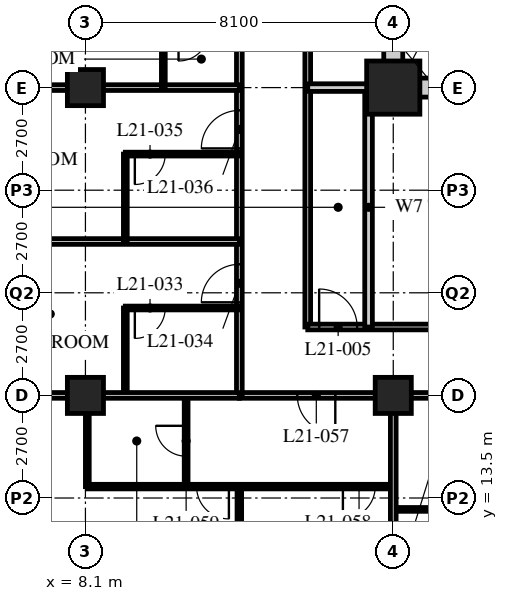
"""IFC4 building model, lengths in metres.
Left out: names, types, materials, properties, quantities, classifications, styles, units other than length and angle.
Written with IfcOpenShell. Run it as: python <this file> out.ifc"""

import sys

from ifc_helpers import new_model, si_unit, direction, frame, frame_2d, origin, origin_2d, place, context, subcontext, project, spatial, rectangle, hollow_rectangle, extrude, element, fill, save


model = new_model("IFC4")
c1 = context("Model", 3, precision=1e-05, world=origin(), true_north=direction((0.0, 1.0)))
c2 = subcontext(c1, "Body", "Model", "MODEL_VIEW")
j1 = project(units=[si_unit("LENGTHUNIT", "METRE"), si_unit("PLANEANGLEUNIT", "RADIAN")], contexts=[c1])
p1 = place(None, origin())
s1 = spatial("IfcSite", under=j1, at=p1, CompositionType="ELEMENT")
p2 = place(p1, origin())
s2 = spatial("IfcBuilding", under=s1, at=p2, CompositionType="ELEMENT")
p3 = place(p2, frame((0.0, 0.0, 84.0)))
s3 = spatial("IfcBuildingStorey", under=s2, at=p3, CompositionType="ELEMENT", Elevation=84.0)
for number, where, z_axis, x_axis in (
    (1, (8.1, 16.2, 0.0), (0.0, 0.0, 1.0), (1.0, 0.0, 0.0)),
    (2, (8.1, 24.3, 0.0), (0.0, 0.0, 1.0), (1.0, 0.0, 0.0)),
    (3, (16.2, 16.2, 0.0), (0.0, 0.0, 1.0), (1.0, 0.0, 0.0)),
):
    element("IfcColumn", number, at=place(p3, frame(where, z_axis=z_axis, x_axis=x_axis)), inside=s3, PredefinedType="COLUMN", context=c2, shape_type="SweptSolid", body=[
        extrude(hollow_rectangle(XDim=0.95, YDim=0.95, WallThickness=0.095, at=origin_2d()), origin(), (0.0, 0.0, 1.0), 3.4),
    ])
p4 = place(p3, frame((16.2, 24.3, 0.0), z_axis=(0.0, 0.0, 1.0), x_axis=(1.0, 0.0, 0.0)))
e4 = element("IfcColumn", 4, at=p4, inside=s3, PredefinedType="COLUMN", context=c2, shape_type="SweptSolid", body=[
    extrude(hollow_rectangle(XDim=1.4, YDim=1.4, WallThickness=0.12, at=origin_2d()), origin(), (0.0, 0.0, 1.0), 3.4),
])
p5 = place(p3, frame((12.15, 16.2, 0.0), z_axis=(0.0, 0.0, 1.0), x_axis=(1.0, 0.0, 0.0)))
e5 = element("IfcWall", 5, at=p5, inside=s3, PredefinedType="PARTITIONING", context=c2, shape_type="SweptSolid", body=[
    extrude(rectangle(XDim=32.4, YDim=0.15, at=frame_2d((16.2, 0.0))), origin(), (0.0, 0.0, 1.0), 2.428),
])
p6 = place(p5, frame((6.5, 0.0, 0.0)))
e6 = element("IfcOpeningElement", 6, at=p6, cuts=e5, PredefinedType="OPENING", context=c2, shape_type="SweptSolid", body=[
    extrude(rectangle(XDim=1.0, YDim=2.1, at=frame_2d((0.5, 1.05))), frame((0.0, 0.085, 0.0), z_axis=(0.0, -1.0, 0.0), x_axis=(1.0, 0.0, 0.0)), (0.0, 0.0, 1.0), 0.17),
])
p7 = place(p5, frame((8.4, 0.0, 0.0)))
e7 = element("IfcOpeningElement", 7, at=p7, cuts=e5, PredefinedType="OPENING", context=c2, shape_type="SweptSolid", body=[
    extrude(rectangle(XDim=1.0, YDim=2.1, at=frame_2d((0.5, 1.05))), frame((0.0, 0.085, 0.0), z_axis=(0.0, -1.0, 0.0), x_axis=(1.0, 0.0, 0.0)), (0.0, 0.0, 1.0), 0.17),
])
p8 = place(p5, frame((14.9, 0.0, 0.0)))
e8 = element("IfcOpeningElement", 8, at=p8, cuts=e5, PredefinedType="OPENING", context=c2, shape_type="SweptSolid", body=[
    extrude(rectangle(XDim=1.0, YDim=2.1, at=frame_2d((0.5, 1.05))), frame((0.0, 0.085, 0.0), z_axis=(0.0, -1.0, 0.0), x_axis=(1.0, 0.0, 0.0)), (0.0, 0.0, 1.0), 0.17),
])
p9 = place(p5, frame((16.5, 0.0, 0.0)))
e9 = element("IfcOpeningElement", 9, at=p9, cuts=e5, PredefinedType="OPENING", context=c2, shape_type="SweptSolid", body=[
    extrude(rectangle(XDim=1.0, YDim=2.1, at=frame_2d((0.5, 1.05))), frame((0.0, 0.085, 0.0), z_axis=(0.0, -1.0, 0.0), x_axis=(1.0, 0.0, 0.0)), (0.0, 0.0, 1.0), 0.17),
])
p10 = place(p5, frame((23.0, 0.0, 0.0)))
e10 = element("IfcOpeningElement", 10, at=p10, cuts=e5, PredefinedType="OPENING", context=c2, shape_type="SweptSolid", body=[
    extrude(rectangle(XDim=1.0, YDim=2.1, at=frame_2d((0.5, 1.05))), frame((0.0, 0.085, 0.0), z_axis=(0.0, -1.0, 0.0), x_axis=(1.0, 0.0, 0.0)), (0.0, 0.0, 1.0), 0.17),
])
p11 = place(p5, frame((24.9, 0.0, 0.0)))
e11 = element("IfcOpeningElement", 11, at=p11, cuts=e5, PredefinedType="OPENING", context=c2, shape_type="SweptSolid", body=[
    extrude(rectangle(XDim=1.0, YDim=2.1, at=frame_2d((0.5, 1.05))), frame((0.0, 0.085, 0.0), z_axis=(0.0, -1.0, 0.0), x_axis=(1.0, 0.0, 0.0)), (0.0, 0.0, 1.0), 0.17),
])
p12 = place(p5, frame((1.525, 0.0, 0.0)))
e12 = element("IfcOpeningElement", 12, at=p12, cuts=e5, PredefinedType="OPENING", context=c2, shape_type="SweptSolid", body=[
    extrude(rectangle(XDim=1.0, YDim=2.1, at=frame_2d((0.5, 1.05))), frame((0.0, 0.085, 0.0), z_axis=(0.0, -1.0, 0.0), x_axis=(1.0, 0.0, 0.0)), (0.0, 0.0, 1.0), 0.17),
])
p13 = place(p5, frame((29.875, 0.0, 0.0)))
e13 = element("IfcOpeningElement", 13, at=p13, cuts=e5, PredefinedType="OPENING", context=c2, shape_type="SweptSolid", body=[
    extrude(rectangle(XDim=1.0, YDim=2.1, at=frame_2d((0.5, 1.05))), frame((0.0, 0.085, 0.0), z_axis=(0.0, -1.0, 0.0), x_axis=(1.0, 0.0, 0.0)), (0.0, 0.0, 1.0), 0.17),
])
p14 = place(p3, frame((12.15, 16.2, 0.0), z_axis=(0.0, 0.0, 1.0), x_axis=(0.0, 1.0, 0.0)))
e14 = element("IfcWall", 14, at=p14, inside=s3, PredefinedType="PARTITIONING", context=c2, shape_type="SweptSolid", body=[
    extrude(rectangle(XDim=26.1, YDim=0.15, at=frame_2d((13.05, 0.0))), origin(), (0.0, 0.0, 1.0), 3.19),
])
p15 = place(p14, frame((2.45, 0.0, 0.0)))
e15 = element("IfcOpeningElement", 15, at=p15, cuts=e14, PredefinedType="OPENING", context=c2, shape_type="SweptSolid", body=[
    extrude(rectangle(XDim=1.0, YDim=2.1, at=frame_2d((0.5, 1.05))), frame((0.0, 0.085, 0.0), z_axis=(0.0, -1.0, 0.0), x_axis=(1.0, 0.0, 0.0)), (0.0, 0.0, 1.0), 0.17),
])
p16 = place(p14, frame((6.5, 0.0, 0.0)))
e16 = element("IfcOpeningElement", 16, at=p16, cuts=e14, PredefinedType="OPENING", context=c2, shape_type="SweptSolid", body=[
    extrude(rectangle(XDim=1.0, YDim=2.1, at=frame_2d((0.5, 1.05))), frame((0.0, 0.085, 0.0), z_axis=(0.0, -1.0, 0.0), x_axis=(1.0, 0.0, 0.0)), (0.0, 0.0, 1.0), 0.17),
])
p17 = place(p14, frame((10.0, 0.0, 0.0)))
e17 = element("IfcOpeningElement", 17, at=p17, cuts=e14, PredefinedType="OPENING", context=c2, shape_type="SweptSolid", body=[
    extrude(rectangle(XDim=1.0, YDim=2.1, at=frame_2d((0.5, 1.05))), frame((0.0, 0.085, 0.0), z_axis=(0.0, -1.0, 0.0), x_axis=(1.0, 0.0, 0.0)), (0.0, 0.0, 1.0), 0.17),
])
p18 = place(p14, frame((18.1, 0.0, 0.0)))
e18 = element("IfcOpeningElement", 18, at=p18, cuts=e14, PredefinedType="OPENING", context=c2, shape_type="SweptSolid", body=[
    extrude(rectangle(XDim=1.0, YDim=2.1, at=frame_2d((0.5, 1.05))), frame((0.0, 0.085, 0.0), z_axis=(0.0, -1.0, 0.0), x_axis=(1.0, 0.0, 0.0)), (0.0, 0.0, 1.0), 0.17),
])
p19 = place(p3, frame((13.95, 40.5, 0.0), z_axis=(0.0, 0.0, 1.0), x_axis=(0.0, -1.0, 0.0)))
e19 = element("IfcWall", 19, at=p19, inside=s3, PredefinedType="PARTITIONING", context=c2, shape_type="SweptSolid", body=[
    extrude(rectangle(XDim=22.5, YDim=0.15, at=frame_2d((11.25, 0.0))), origin(), (0.0, 0.0, 1.0), 3.19),
])
p20 = place(p19, frame((11.65, 0.0, 0.0)))
e20 = element("IfcOpeningElement", 20, at=p20, cuts=e19, PredefinedType="OPENING", context=c2, shape_type="SweptSolid", body=[
    extrude(rectangle(XDim=1.0, YDim=2.1, at=frame_2d((0.5, 1.05))), frame((0.0, 0.085, 0.0), z_axis=(0.0, -1.0, 0.0), x_axis=(1.0, 0.0, 0.0)), (0.0, 0.0, 1.0), 0.17),
])
p21 = place(p19, frame((3.55, 0.0, 0.0)))
e21 = element("IfcOpeningElement", 21, at=p21, cuts=e19, PredefinedType="OPENING", context=c2, shape_type="SweptSolid", body=[
    extrude(rectangle(XDim=1.0, YDim=2.1, at=frame_2d((0.5, 1.05))), frame((0.0, 0.085, 0.0), z_axis=(0.0, -1.0, 0.0), x_axis=(1.0, 0.0, 0.0)), (0.0, 0.0, 1.0), 0.17),
])
p22 = place(p3, frame((13.95, 18.0, 0.0), z_axis=(0.0, 0.0, 1.0), x_axis=(1.0, 0.0, 0.0)))
e22 = element("IfcWall", 22, at=p22, inside=s3, PredefinedType="PARTITIONING", context=c2, shape_type="SweptSolid", body=[
    extrude(rectangle(XDim=13.19, YDim=0.15, at=frame_2d((6.595, 0.0))), origin(), (0.0, 0.0, 1.0), 3.19),
])
p23 = place(p22, frame((0.3, 0.0, 0.0)))
e23 = element("IfcOpeningElement", 23, at=p23, cuts=e22, PredefinedType="OPENING", context=c2, shape_type="SweptSolid", body=[
    extrude(rectangle(XDim=1.0, YDim=2.1, at=frame_2d((0.5, 1.05))), frame((0.0, 0.085, 0.0), z_axis=(0.0, -1.0, 0.0), x_axis=(1.0, 0.0, 0.0)), (0.0, 0.0, 1.0), 0.17),
])
p24 = place(p22, frame((6.9, 0.0, 0.0)))
e24 = element("IfcOpeningElement", 24, at=p24, cuts=e22, PredefinedType="OPENING", context=c2, shape_type="SweptSolid", body=[
    extrude(rectangle(XDim=1.0, YDim=2.1, at=frame_2d((0.5, 1.05))), frame((0.0, 0.085, 0.0), z_axis=(0.0, -1.0, 0.0), x_axis=(1.0, 0.0, 0.0)), (0.0, 0.0, 1.0), 0.17),
])
p25 = place(p3, frame((15.55, 18.0, 0.0), z_axis=(0.0, 0.0, 1.0), x_axis=(0.0, 1.0, 0.0)))
e25 = element("IfcWall", 25, at=p25, inside=s3, PredefinedType="SOLIDWALL", context=c2, shape_type="SweptSolid", body=[
    extrude(rectangle(XDim=6.3, YDim=0.2, at=frame_2d((3.15, 0.0))), origin(), (0.0, 0.0, 1.0), 3.19),
])
p26 = place(p3, frame((13.95, 24.3, 0.0), z_axis=(0.0, 0.0, 1.0), x_axis=(1.0, 0.0, 0.0)))
e26 = element("IfcWall", 26, at=p26, inside=s3, PredefinedType="SOLIDWALL", context=c2, shape_type="SweptSolid", body=[
    extrude(rectangle(XDim=2.25, YDim=0.2, at=frame_2d((1.125, 0.0))), origin(), (0.0, 0.0, 1.0), 2.428),
])
for number, where, z_axis, x_axis in (
    (27, (16.2, 13.2, 0.0), (0.0, 0.0, 1.0), (1.0, 0.0, 0.0)),
    (28, (9.15, 16.2, 0.0), (0.0, 0.0, 1.0), (0.0, 1.0, 0.0)),
):
    element("IfcWall", number, at=place(p3, frame(where, z_axis=z_axis, x_axis=x_axis)), inside=s3, PredefinedType="PARTITIONING", context=c2, shape_type="SweptSolid", body=[
        extrude(rectangle(XDim=2.3, YDim=0.1, at=frame_2d((1.15, 0.0))), origin(), (0.0, 0.0, 1.0), 3.19),
    ])
p27 = place(p3, frame((12.15, 18.5, 0.0), z_axis=(0.0, 0.0, 1.0), x_axis=(-1.0, 0.0, 0.0)))
e29 = element("IfcWall", 29, at=p27, inside=s3, PredefinedType="PARTITIONING", context=c2, shape_type="SweptSolid", body=[
    extrude(rectangle(XDim=3.0, YDim=0.1, at=frame_2d((1.5, 0.0))), origin(), (0.0, 0.0, 1.0), 3.19),
])
p28 = place(p27, frame((1.95, 0.0, 0.0)))
e30 = element("IfcOpeningElement", 30, at=p28, cuts=e29, PredefinedType="OPENING", context=c2, shape_type="SweptSolid", body=[
    extrude(rectangle(XDim=0.8, YDim=2.1, at=frame_2d((0.4, 1.05))), frame((0.0, 0.06, 0.0), z_axis=(0.0, -1.0, 0.0), x_axis=(1.0, 0.0, 0.0)), (0.0, 0.0, 1.0), 0.12),
])
p29 = place(p3, frame((12.15, 20.25, 0.0), z_axis=(0.0, 0.0, 1.0), x_axis=(-1.0, 0.0, 0.0)))
e31 = element("IfcWall", 31, at=p29, inside=s3, PredefinedType="PARTITIONING", context=c2, shape_type="SweptSolid", body=[
    extrude(rectangle(XDim=11.85, YDim=0.15, at=frame_2d((5.925, 0.0))), origin(), (0.0, 0.0, 1.0), 3.19),
])
p30 = place(p3, frame((9.15, 20.25, 0.0), z_axis=(0.0, 0.0, 1.0), x_axis=(0.0, 1.0, 0.0)))
e32 = element("IfcWall", 32, at=p30, inside=s3, PredefinedType="PARTITIONING", context=c2, shape_type="SweptSolid", body=[
    extrude(rectangle(XDim=2.3, YDim=0.1, at=frame_2d((1.15, 0.0))), origin(), (0.0, 0.0, 1.0), 3.19),
])
p31 = place(p3, frame((12.15, 22.55, 0.0), z_axis=(0.0, 0.0, 1.0), x_axis=(-1.0, 0.0, 0.0)))
e33 = element("IfcWall", 33, at=p31, inside=s3, PredefinedType="PARTITIONING", context=c2, shape_type="SweptSolid", body=[
    extrude(rectangle(XDim=3.0, YDim=0.1, at=frame_2d((1.5, 0.0))), origin(), (0.0, 0.0, 1.0), 3.19),
])
p32 = place(p31, frame((1.95, 0.0, 0.0)))
e34 = element("IfcOpeningElement", 34, at=p32, cuts=e33, PredefinedType="OPENING", context=c2, shape_type="SweptSolid", body=[
    extrude(rectangle(XDim=0.8, YDim=2.1, at=frame_2d((0.4, 1.05))), frame((0.0, 0.06, 0.0), z_axis=(0.0, -1.0, 0.0), x_axis=(1.0, 0.0, 0.0)), (0.0, 0.0, 1.0), 0.12),
])
p33 = place(p3, frame((12.15, 24.3, 0.0), z_axis=(0.0, 0.0, 1.0), x_axis=(-1.0, 0.0, 0.0)))
e35 = element("IfcWall", 35, at=p33, inside=s3, PredefinedType="PARTITIONING", context=c2, shape_type="SweptSolid", body=[
    extrude(rectangle(XDim=11.85, YDim=0.15, at=frame_2d((5.925, 0.0))), origin(), (0.0, 0.0, 1.0), 2.428),
])
p34 = place(p3, frame((10.15, 24.3, 0.0), z_axis=(0.0, 0.0, 1.0), x_axis=(0.0, 1.0, 0.0)))
e36 = element("IfcWall", 36, at=p34, inside=s3, PredefinedType="PARTITIONING", context=c2, shape_type="SweptSolid", body=[
    extrude(rectangle(XDim=1.5, YDim=0.1, at=frame_2d((0.75, 0.0))), origin(), (0.0, 0.0, 1.0), 3.19),
])
p35 = place(p3, frame((10.75, 16.2, 0.0), z_axis=(0.0, 0.0, 1.0), x_axis=(0.0, -1.0, 0.0)))
e37 = element("IfcWall", 37, at=p35, inside=s3, PredefinedType="PARTITIONING", context=c2, shape_type="SweptSolid", body=[
    extrude(rectangle(XDim=2.4, YDim=0.1, at=frame_2d((1.2, 0.0))), origin(), (0.0, 0.0, 1.0), 3.19),
])
p36 = place(p35, frame((0.8, 0.0, 0.0)))
e38 = element("IfcOpeningElement", 38, at=p36, cuts=e37, PredefinedType="OPENING", context=c2, shape_type="SweptSolid", body=[
    extrude(rectangle(XDim=0.8, YDim=2.1, at=frame_2d((0.4, 1.05))), frame((0.0, 0.06, 0.0), z_axis=(0.0, -1.0, 0.0), x_axis=(1.0, 0.0, 0.0)), (0.0, 0.0, 1.0), 0.12),
])
p37 = place(p3, frame((8.15, 16.2, 0.0), z_axis=(0.0, 0.0, 1.0), x_axis=(0.0, -1.0, 0.0)))
e39 = element("IfcWall", 39, at=p37, inside=s3, PredefinedType="PARTITIONING", context=c2, shape_type="SweptSolid", body=[
    extrude(rectangle(XDim=2.4, YDim=0.1, at=frame_2d((1.2, 0.0))), origin(), (0.0, 0.0, 1.0), 2.428),
])
p38 = place(p3, frame((8.15, 13.8, 0.0), z_axis=(0.0, 0.0, 1.0), x_axis=(1.0, 0.0, 0.0)))
e40 = element("IfcWall", 40, at=p38, inside=s3, PredefinedType="PARTITIONING", context=c2, shape_type="SweptSolid", body=[
    extrude(rectangle(XDim=8.05, YDim=0.12, at=frame_2d((4.025, 0.0))), origin(), (0.0, 0.0, 1.0), 3.19),
])
p39 = place(p38, frame((6.725, 0.0, 0.0)))
e41 = element("IfcOpeningElement", 41, at=p39, cuts=e40, PredefinedType="OPENING", context=c2, shape_type="SweptSolid", body=[
    extrude(rectangle(XDim=0.85, YDim=2.1, at=frame_2d((0.425, 1.05))), frame((0.0, 0.07, 0.0), z_axis=(0.0, -1.0, 0.0), x_axis=(1.0, 0.0, 0.0)), (0.0, 0.0, 1.0), 0.14),
])
p40 = place(p38, frame((2.875, 0.0, 0.0)))
e42 = element("IfcOpeningElement", 42, at=p40, cuts=e40, PredefinedType="OPENING", context=c2, shape_type="SweptSolid", body=[
    extrude(rectangle(XDim=0.85, YDim=2.1, at=frame_2d((0.425, 1.05))), frame((0.0, 0.07, 0.0), z_axis=(0.0, -1.0, 0.0), x_axis=(1.0, 0.0, 0.0)), (0.0, 0.0, 1.0), 0.14),
])
p41 = place(p3, frame((12.15, 13.8, 0.0), z_axis=(0.0, 0.0, 1.0), x_axis=(0.0, -1.0, 0.0)))
e43 = element("IfcWall", 43, at=p41, inside=s3, PredefinedType="PARTITIONING", context=c2, shape_type="SweptSolid", body=[
    extrude(rectangle(XDim=13.5, YDim=0.12, at=frame_2d((6.75, 0.0))), origin(), (0.0, 0.0, 1.0), 3.19),
])
p42 = place(p3, frame((0.3, 16.2, 0.0), z_axis=(0.0, 0.0, 1.0), x_axis=(1.0, 0.0, 0.0)))
e44 = element("IfcWall", 44, at=p42, inside=s3, PredefinedType="PARTITIONING", context=c2, shape_type="SweptSolid", body=[
    extrude(rectangle(XDim=11.85, YDim=0.15, at=frame_2d((5.925, 0.0))), origin(), (0.0, 0.0, 1.0), 2.428),
])
p43 = place(p3, frame((16.2, 16.2, 0.0), z_axis=(0.0, 0.0, 1.0), x_axis=(0.0, -1.0, 0.0)))
e45 = element("IfcWall", 45, at=p43, inside=s3, PredefinedType="PARTITIONING", context=c2, shape_type="SweptSolid", body=[
    extrude(rectangle(XDim=15.9, YDim=0.15, at=frame_2d((7.95, 0.0))), origin(), (0.0, 0.0, 1.0), 2.428),
])
p44 = place(p3, frame((15.95, 24.3, 0.0), z_axis=(0.0, 0.0, 1.0), x_axis=(1.0, 0.0, 0.0)))
e46 = element("IfcWall", 46, at=p44, inside=s3, PredefinedType="SOLIDWALL", context=c2, shape_type="SweptSolid", body=[
    extrude(rectangle(XDim=24.8, YDim=0.5, at=frame_2d((12.4, 0.0))), origin(), (0.0, 0.0, 1.0), 2.428),
])
p45 = place(p44, frame((11.5, 0.0, 0.0)))
e47 = element("IfcOpeningElement", 47, at=p45, cuts=e46, PredefinedType="OPENING", context=c2, shape_type="SweptSolid", body=[
    extrude(rectangle(XDim=1.8, YDim=2.4, at=frame_2d((0.9, 1.2))), frame((0.0, 0.26, 0.0), z_axis=(0.0, -1.0, 0.0), x_axis=(1.0, 0.0, 0.0)), (0.0, 0.0, 1.0), 0.52),
])
p46 = place(p3, frame((16.2, 24.55, 0.0), z_axis=(0.0, 0.0, 1.0), x_axis=(0.0, 1.0, 0.0)))
e48 = element("IfcWall", 48, at=p46, inside=s3, PredefinedType="SOLIDWALL", context=c2, shape_type="SweptSolid", body=[
    extrude(rectangle(XDim=15.7, YDim=0.5, at=frame_2d((7.85, 0.0))), origin(), (0.0, 0.0, 1.0), 2.428),
])
p47 = place(p23, origin())
e49 = element("IfcDoor", 49, at=p47, inside=s3, OperationType="SINGLE_SWING_LEFT", PredefinedType="DOOR", context=c2, shape_type="SweptSolid", body=[
    extrude(rectangle(XDim=1.0, YDim=2.1, at=frame_2d((0.5, 1.05))), frame((0.0, 0.025, 0.0), z_axis=(0.0, -1.0, 0.0), x_axis=(1.0, 0.0, 0.0)), (0.0, 0.0, 1.0), 0.05),
])
fill(e23, e49)
p48 = place(p28, origin())
e50 = element("IfcDoor", 50, at=p48, inside=s3, OperationType="SINGLE_SWING_RIGHT", PredefinedType="DOOR", context=c2, shape_type="SweptSolid", body=[
    extrude(rectangle(XDim=0.8, YDim=2.1, at=frame_2d((0.4, 1.05))), frame((0.0, 0.025, 0.0), z_axis=(0.0, -1.0, 0.0), x_axis=(1.0, 0.0, 0.0)), (0.0, 0.0, 1.0), 0.05),
])
fill(e30, e50)
p49 = place(p15, origin())
e51 = element("IfcDoor", 51, at=p49, inside=s3, OperationType="SINGLE_SWING_LEFT", PredefinedType="DOOR", context=c2, shape_type="SweptSolid", body=[
    extrude(rectangle(XDim=1.0, YDim=2.1, at=frame_2d((0.5, 1.05))), frame((0.0, 0.025, 0.0), z_axis=(0.0, -1.0, 0.0), x_axis=(1.0, 0.0, 0.0)), (0.0, 0.0, 1.0), 0.05),
])
fill(e15, e51)
p50 = place(p32, origin())
e52 = element("IfcDoor", 52, at=p50, inside=s3, OperationType="SINGLE_SWING_RIGHT", PredefinedType="DOOR", context=c2, shape_type="SweptSolid", body=[
    extrude(rectangle(XDim=0.8, YDim=2.1, at=frame_2d((0.4, 1.05))), frame((0.0, 0.025, 0.0), z_axis=(0.0, -1.0, 0.0), x_axis=(1.0, 0.0, 0.0)), (0.0, 0.0, 1.0), 0.05),
])
fill(e34, e52)
p51 = place(p16, origin())
e53 = element("IfcDoor", 53, at=p51, inside=s3, OperationType="SINGLE_SWING_LEFT", PredefinedType="DOOR", context=c2, shape_type="SweptSolid", body=[
    extrude(rectangle(XDim=1.0, YDim=2.1, at=frame_2d((0.5, 1.05))), frame((0.0, 0.025, 0.0), z_axis=(0.0, -1.0, 0.0), x_axis=(1.0, 0.0, 0.0)), (0.0, 0.0, 1.0), 0.05),
])
fill(e16, e53)
p52 = place(p12, origin())
e54 = element("IfcDoor", 54, at=p52, inside=s3, OperationType="SINGLE_SWING_LEFT", PredefinedType="DOOR", context=c2, shape_type="SweptSolid", body=[
    extrude(rectangle(XDim=1.0, YDim=2.1, at=frame_2d((0.5, 1.05))), frame((0.0, 0.025, 0.0), z_axis=(0.0, -1.0, 0.0), x_axis=(1.0, 0.0, 0.0)), (0.0, 0.0, 1.0), 0.05),
])
fill(e12, e54)
p53 = place(p39, origin())
e55 = element("IfcDoor", 55, at=p53, inside=s3, OperationType="SINGLE_SWING_RIGHT", PredefinedType="DOOR", context=c2, shape_type="SweptSolid", body=[
    extrude(rectangle(XDim=0.85, YDim=2.1, at=frame_2d((0.425, 1.05))), frame((0.0, 0.025, 0.0), z_axis=(0.0, -1.0, 0.0), x_axis=(1.0, 0.0, 0.0)), (0.0, 0.0, 1.0), 0.05),
])
fill(e41, e55)
p54 = place(p36, origin())
e56 = element("IfcDoor", 56, at=p54, inside=s3, OperationType="SINGLE_SWING_RIGHT", PredefinedType="DOOR", context=c2, shape_type="SweptSolid", body=[
    extrude(rectangle(XDim=0.8, YDim=2.1, at=frame_2d((0.4, 1.05))), frame((0.0, 0.025, 0.0), z_axis=(0.0, -1.0, 0.0), x_axis=(1.0, 0.0, 0.0)), (0.0, 0.0, 1.0), 0.05),
])
fill(e38, e56)
p55 = place(p40, origin())
e57 = element("IfcDoor", 57, at=p55, inside=s3, OperationType="SINGLE_SWING_LEFT", PredefinedType="DOOR", context=c2, shape_type="SweptSolid", body=[
    extrude(rectangle(XDim=0.85, YDim=2.1, at=frame_2d((0.425, 1.05))), frame((0.0, 0.025, 0.0), z_axis=(0.0, -1.0, 0.0), x_axis=(1.0, 0.0, 0.0)), (0.0, 0.0, 1.0), 0.05),
])
fill(e42, e57)
save(model, sys.argv[1])
